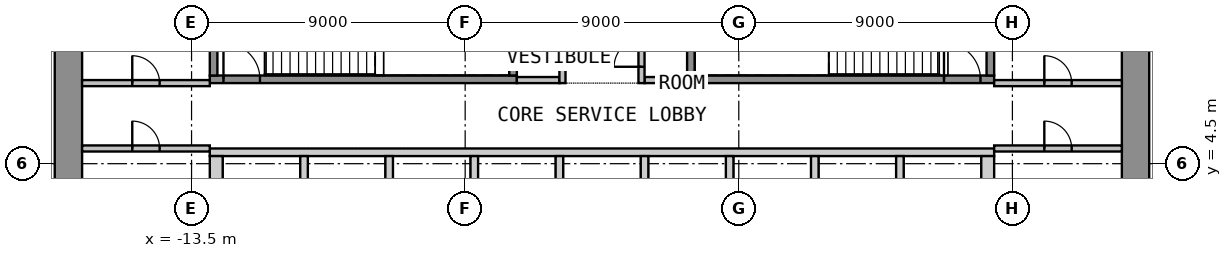
"""IFC4 building model, lengths in metres.
Left out: names, types, materials, properties, quantities, classifications, styles, units other than length and angle.
Written with IfcOpenShell. Run it as: python <this file> out.ifc"""

import sys

from ifc_helpers import new_model, si_unit, direction, frame, frame_2d, origin, place, context, subcontext, project, spatial, polyline, rectangle, outline, extrude, element, fill, save


model = new_model("IFC4")
c1 = context("Model", 3, precision=1e-05, world=origin(), true_north=direction((0.0, 1.0)))
c2 = subcontext(c1, "Body", "Model", "MODEL_VIEW")
j1 = project(units=[si_unit("LENGTHUNIT", "METRE"), si_unit("PLANEANGLEUNIT", "RADIAN")], contexts=[c1])
p1 = place(None, origin())
s1 = spatial("IfcSite", under=j1, at=p1, CompositionType="ELEMENT")
p2 = place(p1, origin())
s2 = spatial("IfcBuilding", under=s1, at=p2, CompositionType="ELEMENT")
p3 = place(p2, frame((0.0, 0.0, 10.8)))
s3 = spatial("IfcBuildingStorey", under=s2, at=p3, CompositionType="ELEMENT", Elevation=10.8)
p4 = place(p3, frame((-17.55, -12.6, 0.0), z_axis=(0.0, 0.0, 1.0), x_axis=(0.0, 1.0, 0.0)))
e1 = element("IfcWall", 1, at=p4, inside=s3, PredefinedType="SHEAR", context=c2, shape_type="SweptSolid", body=[
    extrude(rectangle(XDim=25.2, YDim=0.9, at=frame_2d((12.6, 0.0))), origin(), (0.0, 0.0, 1.0), 4.4),
])
p5 = place(p4, frame((11.4, 0.0, 0.0)))
e2 = element("IfcOpeningElement", 2, at=p5, cuts=e1, PredefinedType="OPENING", context=c2, shape_type="SweptSolid", body=[
    extrude(rectangle(XDim=2.4, YDim=2.1, at=frame_2d((1.2, 1.05))), frame((0.0, 0.46, 0.0), z_axis=(0.0, -1.0, 0.0), x_axis=(1.0, 0.0, 0.0)), (0.0, 0.0, 1.0), 0.92),
])
p6 = place(p3, frame((17.55, -12.6, 0.0), z_axis=(0.0, 0.0, 1.0), x_axis=(0.0, 1.0, 0.0)))
e3 = element("IfcWall", 3, at=p6, inside=s3, PredefinedType="SHEAR", context=c2, shape_type="SweptSolid", body=[
    extrude(rectangle(XDim=25.2, YDim=0.9, at=frame_2d((12.6, 0.0))), origin(), (0.0, 0.0, 1.0), 4.4),
])
p7 = place(p6, frame((11.4, 0.0, 0.0)))
e4 = element("IfcOpeningElement", 4, at=p7, cuts=e3, PredefinedType="OPENING", context=c2, shape_type="SweptSolid", body=[
    extrude(rectangle(XDim=2.4, YDim=2.1, at=frame_2d((1.2, 1.05))), frame((0.0, 0.46, 0.0), z_axis=(0.0, -1.0, 0.0), x_axis=(1.0, 0.0, 0.0)), (0.0, 0.0, 1.0), 0.92),
])
p8 = place(p3, origin())
e5 = element("IfcWall", 5, at=p8, inside=s3, PredefinedType="SHEAR", context=c2, shape_type="SweptSolid", body=[
    extrude(outline(polyline([(-12.9, 4.75), (12.9, 4.75), (12.9, 5.0), (-12.9, 5.0), (-12.9, 4.75)])), origin(), (0.0, 0.0, 1.0), 4.4),
])
p9 = place(p3, origin())
e6 = element("IfcWall", 6, at=p9, inside=s3, PredefinedType="SHEAR", context=c2, shape_type="SweptSolid", body=[
    extrude(outline(polyline([(-12.9, 2.05), (-12.475, 2.05), (-12.475, 4.75), (-12.9, 4.75), (-12.9, 2.05)])), origin(), (0.0, 0.0, 1.0), 4.4),
])
p10 = place(p3, origin())
e7 = element("IfcWall", 7, at=p10, inside=s3, PredefinedType="SHEAR", context=c2, shape_type="SweptSolid", body=[
    extrude(outline(polyline([(-9.925, 2.05), (-9.675, 2.05), (-9.675, 4.75), (-9.925, 4.75), (-9.925, 2.05)])), origin(), (0.0, 0.0, 1.0), 4.4),
])
p11 = place(p3, origin())
e8 = element("IfcWall", 8, at=p11, inside=s3, PredefinedType="SHEAR", context=c2, shape_type="SweptSolid", body=[
    extrude(outline(polyline([(-7.125, 2.05), (-6.875, 2.05), (-6.875, 4.75), (-7.125, 4.75), (-7.125, 2.05)])), origin(), (0.0, 0.0, 1.0), 4.4),
])
p12 = place(p3, origin())
e9 = element("IfcWall", 9, at=p12, inside=s3, PredefinedType="SHEAR", context=c2, shape_type="SweptSolid", body=[
    extrude(outline(polyline([(-4.325, 2.05), (-4.075, 2.05), (-4.075, 4.75), (-4.325, 4.75), (-4.325, 2.05)])), origin(), (0.0, 0.0, 1.0), 4.4),
])
p13 = place(p3, origin())
e10 = element("IfcWall", 10, at=p13, inside=s3, PredefinedType="SHEAR", context=c2, shape_type="SweptSolid", body=[
    extrude(outline(polyline([(-1.525, 2.05), (-1.275, 2.05), (-1.275, 4.75), (-1.525, 4.75), (-1.525, 2.05)])), origin(), (0.0, 0.0, 1.0), 4.4),
])
p14 = place(p3, origin())
e11 = element("IfcWall", 11, at=p14, inside=s3, PredefinedType="SHEAR", context=c2, shape_type="SweptSolid", body=[
    extrude(outline(polyline([(1.275, 2.05), (1.525, 2.05), (1.525, 4.75), (1.275, 4.75), (1.275, 2.05)])), origin(), (0.0, 0.0, 1.0), 4.4),
])
p15 = place(p3, origin())
e12 = element("IfcWall", 12, at=p15, inside=s3, PredefinedType="SHEAR", context=c2, shape_type="SweptSolid", body=[
    extrude(outline(polyline([(4.075, 2.05), (4.325, 2.05), (4.325, 4.75), (4.075, 4.75), (4.075, 2.05)])), origin(), (0.0, 0.0, 1.0), 4.4),
])
p16 = place(p3, origin())
e13 = element("IfcWall", 13, at=p16, inside=s3, PredefinedType="SHEAR", context=c2, shape_type="SweptSolid", body=[
    extrude(outline(polyline([(6.875, 2.05), (7.125, 2.05), (7.125, 4.75), (6.875, 4.75), (6.875, 2.05)])), origin(), (0.0, 0.0, 1.0), 4.4),
])
p17 = place(p3, origin())
e14 = element("IfcWall", 14, at=p17, inside=s3, PredefinedType="SHEAR", context=c2, shape_type="SweptSolid", body=[
    extrude(outline(polyline([(9.675, 2.05), (9.925, 2.05), (9.925, 4.75), (9.675, 4.75), (9.675, 2.05)])), origin(), (0.0, 0.0, 1.0), 4.4),
])
p18 = place(p3, origin())
e15 = element("IfcWall", 15, at=p18, inside=s3, PredefinedType="SHEAR", context=c2, shape_type="SweptSolid", body=[
    extrude(outline(polyline([(12.475, 2.05), (12.9, 2.05), (12.9, 4.75), (12.475, 4.75), (12.475, 2.05)])), origin(), (0.0, 0.0, 1.0), 4.4),
])
p19 = place(p3, frame((-12.9, 7.275, 0.0), z_axis=(0.0, 0.0, 1.0), x_axis=(1.0, 0.0, 0.0)))
e16 = element("IfcWall", 16, at=p19, inside=s3, PredefinedType="SHEAR", context=c2, shape_type="SweptSolid", body=[
    extrude(rectangle(XDim=10.1, YDim=0.25, at=frame_2d((5.05, 0.0))), origin(), (0.0, 0.0, 1.0), 4.4),
])
p20 = place(p19, frame((0.45, 0.0, 0.0)))
e17 = element("IfcOpeningElement", 17, at=p20, cuts=e16, PredefinedType="OPENING", context=c2, shape_type="SweptSolid", body=[
    extrude(rectangle(XDim=1.2, YDim=2.1, at=frame_2d((0.6, 1.05))), frame((0.0, 0.135, 0.0), z_axis=(0.0, -1.0, 0.0), x_axis=(1.0, 0.0, 0.0)), (0.0, 0.0, 1.0), 0.27),
])
for number, where, z_axis, x_axis in (
    (18, (-12.775, 7.4, 0.0), (0.0, 0.0, 1.0), (0.0, 1.0, 0.0)),
    (19, (-2.925, 7.4, 0.0), (0.0, 0.0, 1.0), (0.0, 1.0, 0.0)),
):
    element("IfcWall", number, at=place(p3, frame(where, z_axis=z_axis, x_axis=x_axis)), inside=s3, PredefinedType="SHEAR", context=c2, shape_type="SweptSolid", body=[
        extrude(rectangle(XDim=3.25, YDim=0.25, at=frame_2d((1.625, 0.0))), origin(), (0.0, 0.0, 1.0), 4.4),
    ])
p21 = place(p3, frame((2.8, 7.275, 0.0), z_axis=(0.0, 0.0, 1.0), x_axis=(1.0, 0.0, 0.0)))
e20 = element("IfcWall", 20, at=p21, inside=s3, PredefinedType="SHEAR", context=c2, shape_type="SweptSolid", body=[
    extrude(rectangle(XDim=10.1, YDim=0.25, at=frame_2d((5.05, 0.0))), origin(), (0.0, 0.0, 1.0), 4.4),
])
p22 = place(p21, frame((8.45, 0.0, 0.0)))
e21 = element("IfcOpeningElement", 21, at=p22, cuts=e20, PredefinedType="OPENING", context=c2, shape_type="SweptSolid", body=[
    extrude(rectangle(XDim=1.2, YDim=2.1, at=frame_2d((0.6, 1.05))), frame((0.0, 0.135, 0.0), z_axis=(0.0, -1.0, 0.0), x_axis=(1.0, 0.0, 0.0)), (0.0, 0.0, 1.0), 0.27),
])
for number, where, z_axis, x_axis in (
    (22, (2.925, 7.4, 0.0), (0.0, 0.0, 1.0), (0.0, 1.0, 0.0)),
    (23, (12.775, 7.4, 0.0), (0.0, 0.0, 1.0), (0.0, 1.0, 0.0)),
):
    element("IfcWall", number, at=place(p3, frame(where, z_axis=z_axis, x_axis=x_axis)), inside=s3, PredefinedType="SHEAR", context=c2, shape_type="SweptSolid", body=[
        extrude(rectangle(XDim=3.25, YDim=0.25, at=frame_2d((1.625, 0.0))), origin(), (0.0, 0.0, 1.0), 4.4),
    ])
for number, where, z_axis, x_axis in (
    (24, (-2.8, 7.25, 0.0), (0.0, 0.0, 1.0), (1.0, 0.0, 0.0)),
    (25, (1.4, 7.25, 0.0), (0.0, 0.0, 1.0), (1.0, 0.0, 0.0)),
):
    element("IfcWall", number, at=place(p3, frame(where, z_axis=z_axis, x_axis=x_axis)), inside=s3, PredefinedType="PARTITIONING", context=c2, shape_type="SweptSolid", body=[
        extrude(rectangle(XDim=1.4, YDim=0.2, at=frame_2d((0.7, 0.0))), origin(), (0.0, 0.0, 1.0), 4.4),
    ])
p23 = place(p3, frame((-1.3, 7.15, 0.0), z_axis=(0.0, 0.0, 1.0), x_axis=(0.0, 1.0, 0.0)))
e26 = element("IfcWall", 26, at=p23, inside=s3, PredefinedType="PARTITIONING", context=c2, shape_type="SweptSolid", body=[
    extrude(rectangle(XDim=5.45, YDim=0.2, at=frame_2d((2.725, 0.0))), origin(), (0.0, 0.0, 1.0), 4.4),
])
p24 = place(p23, frame((1.587, 0.0, 0.0)))
e27 = element("IfcOpeningElement", 27, at=p24, cuts=e26, PredefinedType="OPENING", context=c2, shape_type="SweptSolid", body=[
    extrude(rectangle(XDim=0.9, YDim=2.1, at=frame_2d((0.45, 1.05))), frame((0.0, 0.11, 0.0), z_axis=(0.0, -1.0, 0.0), x_axis=(1.0, 0.0, 0.0)), (0.0, 0.0, 1.0), 0.22),
])
p25 = place(p23, frame((4.212, 0.0, 0.0)))
e28 = element("IfcOpeningElement", 28, at=p25, cuts=e26, PredefinedType="OPENING", context=c2, shape_type="SweptSolid", body=[
    extrude(rectangle(XDim=0.9, YDim=2.1, at=frame_2d((0.45, 1.05))), frame((0.0, 0.11, 0.0), z_axis=(0.0, -1.0, 0.0), x_axis=(1.0, 0.0, 0.0)), (0.0, 0.0, 1.0), 0.22),
])
p26 = place(p3, frame((1.3, 7.15, 0.0), z_axis=(0.0, 0.0, 1.0), x_axis=(0.0, 1.0, 0.0)))
e29 = element("IfcWall", 29, at=p26, inside=s3, PredefinedType="PARTITIONING", context=c2, shape_type="SweptSolid", body=[
    extrude(rectangle(XDim=5.45, YDim=0.2, at=frame_2d((2.725, 0.0))), origin(), (0.0, 0.0, 1.0), 4.4),
])
p27 = place(p26, frame((0.538, 0.0, 0.0)))
e30 = element("IfcOpeningElement", 30, at=p27, cuts=e29, PredefinedType="OPENING", context=c2, shape_type="SweptSolid", body=[
    extrude(rectangle(XDim=0.9, YDim=2.1, at=frame_2d((0.45, 1.05))), frame((0.0, 0.11, 0.0), z_axis=(0.0, -1.0, 0.0), x_axis=(1.0, 0.0, 0.0)), (0.0, 0.0, 1.0), 0.22),
])
p28 = place(p26, frame((3.163, 0.0, 0.0)))
e31 = element("IfcOpeningElement", 31, at=p28, cuts=e29, PredefinedType="OPENING", context=c2, shape_type="SweptSolid", body=[
    extrude(rectangle(XDim=0.9, YDim=2.1, at=frame_2d((0.45, 1.05))), frame((0.0, 0.11, 0.0), z_axis=(0.0, -1.0, 0.0), x_axis=(1.0, 0.0, 0.0)), (0.0, 0.0, 1.0), 0.22),
])
p29 = place(p3, frame((-17.1, 7.15, 0.0), z_axis=(0.0, 0.0, 1.0), x_axis=(1.0, 0.0, 0.0)))
e32 = element("IfcWall", 32, at=p29, inside=s3, PredefinedType="PARTITIONING", context=c2, shape_type="SweptSolid", body=[
    extrude(rectangle(XDim=4.2, YDim=0.2, at=frame_2d((2.1, 0.0))), origin(), (0.0, 0.0, 1.0), 4.4),
])
p30 = place(p29, frame((1.65, 0.0, 0.0)))
e33 = element("IfcOpeningElement", 33, at=p30, cuts=e32, PredefinedType="OPENING", context=c2, shape_type="SweptSolid", body=[
    extrude(rectangle(XDim=0.9, YDim=2.1, at=frame_2d((0.45, 1.05))), frame((0.0, 0.11, 0.0), z_axis=(0.0, -1.0, 0.0), x_axis=(1.0, 0.0, 0.0)), (0.0, 0.0, 1.0), 0.22),
])
p31 = place(p3, frame((-17.1, 5.0, 0.0), z_axis=(0.0, 0.0, 1.0), x_axis=(1.0, 0.0, 0.0)))
e34 = element("IfcWall", 34, at=p31, inside=s3, PredefinedType="PARTITIONING", context=c2, shape_type="SweptSolid", body=[
    extrude(rectangle(XDim=4.2, YDim=0.2, at=frame_2d((2.1, 0.0))), origin(), (0.0, 0.0, 1.0), 4.4),
])
p32 = place(p31, frame((1.65, 0.0, 0.0)))
e35 = element("IfcOpeningElement", 35, at=p32, cuts=e34, PredefinedType="OPENING", context=c2, shape_type="SweptSolid", body=[
    extrude(rectangle(XDim=0.9, YDim=2.1, at=frame_2d((0.45, 1.05))), frame((0.0, 0.11, 0.0), z_axis=(0.0, -1.0, 0.0), x_axis=(1.0, 0.0, 0.0)), (0.0, 0.0, 1.0), 0.22),
])
p33 = place(p3, frame((12.9, 7.15, 0.0), z_axis=(0.0, 0.0, 1.0), x_axis=(1.0, 0.0, 0.0)))
e36 = element("IfcWall", 36, at=p33, inside=s3, PredefinedType="PARTITIONING", context=c2, shape_type="SweptSolid", body=[
    extrude(rectangle(XDim=4.2, YDim=0.2, at=frame_2d((2.1, 0.0))), origin(), (0.0, 0.0, 1.0), 4.4),
])
p34 = place(p33, frame((1.65, 0.0, 0.0)))
e37 = element("IfcOpeningElement", 37, at=p34, cuts=e36, PredefinedType="OPENING", context=c2, shape_type="SweptSolid", body=[
    extrude(rectangle(XDim=0.9, YDim=2.1, at=frame_2d((0.45, 1.05))), frame((0.0, 0.11, 0.0), z_axis=(0.0, -1.0, 0.0), x_axis=(1.0, 0.0, 0.0)), (0.0, 0.0, 1.0), 0.22),
])
p35 = place(p3, frame((12.9, 5.0, 0.0), z_axis=(0.0, 0.0, 1.0), x_axis=(1.0, 0.0, 0.0)))
e38 = element("IfcWall", 38, at=p35, inside=s3, PredefinedType="PARTITIONING", context=c2, shape_type="SweptSolid", body=[
    extrude(rectangle(XDim=4.2, YDim=0.2, at=frame_2d((2.1, 0.0))), origin(), (0.0, 0.0, 1.0), 4.4),
])
p36 = place(p35, frame((1.65, 0.0, 0.0)))
e39 = element("IfcOpeningElement", 39, at=p36, cuts=e38, PredefinedType="OPENING", context=c2, shape_type="SweptSolid", body=[
    extrude(rectangle(XDim=0.9, YDim=2.1, at=frame_2d((0.45, 1.05))), frame((0.0, 0.11, 0.0), z_axis=(0.0, -1.0, 0.0), x_axis=(1.0, 0.0, 0.0)), (0.0, 0.0, 1.0), 0.22),
])
p37 = place(p20, origin())
e40 = element("IfcDoor", 40, at=p37, inside=s3, OperationType="SINGLE_SWING_LEFT", PredefinedType="DOOR", context=c2, shape_type="SweptSolid", body=[
    extrude(rectangle(XDim=1.2, YDim=2.1, at=frame_2d((0.6, 1.05))), frame((0.0, 0.025, 0.0), z_axis=(0.0, -1.0, 0.0), x_axis=(1.0, 0.0, 0.0)), (0.0, 0.0, 1.0), 0.05),
])
fill(e17, e40)
p38 = place(p22, origin())
e41 = element("IfcDoor", 41, at=p38, inside=s3, OperationType="SINGLE_SWING_LEFT", PredefinedType="DOOR", context=c2, shape_type="SweptSolid", body=[
    extrude(rectangle(XDim=1.2, YDim=2.1, at=frame_2d((0.6, 1.05))), frame((0.0, 0.025, 0.0), z_axis=(0.0, -1.0, 0.0), x_axis=(1.0, 0.0, 0.0)), (0.0, 0.0, 1.0), 0.05),
])
fill(e21, e41)
p39 = place(p27, origin())
e42 = element("IfcDoor", 42, at=p39, inside=s3, OperationType="SINGLE_SWING_LEFT", PredefinedType="DOOR", context=c2, shape_type="SweptSolid", body=[
    extrude(rectangle(XDim=0.9, YDim=2.1, at=frame_2d((0.45, 1.05))), frame((0.0, 0.025, 0.0), z_axis=(0.0, -1.0, 0.0), x_axis=(1.0, 0.0, 0.0)), (0.0, 0.0, 1.0), 0.05),
])
fill(e30, e42)
p40 = place(p30, origin())
e43 = element("IfcDoor", 43, at=p40, inside=s3, OperationType="SINGLE_SWING_LEFT", PredefinedType="DOOR", context=c2, shape_type="SweptSolid", body=[
    extrude(rectangle(XDim=0.9, YDim=2.1, at=frame_2d((0.45, 1.05))), frame((0.0, 0.025, 0.0), z_axis=(0.0, -1.0, 0.0), x_axis=(1.0, 0.0, 0.0)), (0.0, 0.0, 1.0), 0.05),
])
fill(e33, e43)
p41 = place(p32, origin())
e44 = element("IfcDoor", 44, at=p41, inside=s3, OperationType="SINGLE_SWING_LEFT", PredefinedType="DOOR", context=c2, shape_type="SweptSolid", body=[
    extrude(rectangle(XDim=0.9, YDim=2.1, at=frame_2d((0.45, 1.05))), frame((0.0, 0.025, 0.0), z_axis=(0.0, -1.0, 0.0), x_axis=(1.0, 0.0, 0.0)), (0.0, 0.0, 1.0), 0.05),
])
fill(e35, e44)
p42 = place(p34, origin())
e45 = element("IfcDoor", 45, at=p42, inside=s3, OperationType="SINGLE_SWING_LEFT", PredefinedType="DOOR", context=c2, shape_type="SweptSolid", body=[
    extrude(rectangle(XDim=0.9, YDim=2.1, at=frame_2d((0.45, 1.05))), frame((0.0, 0.025, 0.0), z_axis=(0.0, -1.0, 0.0), x_axis=(1.0, 0.0, 0.0)), (0.0, 0.0, 1.0), 0.05),
])
fill(e37, e45)
p43 = place(p36, origin())
e46 = element("IfcDoor", 46, at=p43, inside=s3, OperationType="SINGLE_SWING_LEFT", PredefinedType="DOOR", context=c2, shape_type="SweptSolid", body=[
    extrude(rectangle(XDim=0.9, YDim=2.1, at=frame_2d((0.45, 1.05))), frame((0.0, 0.025, 0.0), z_axis=(0.0, -1.0, 0.0), x_axis=(1.0, 0.0, 0.0)), (0.0, 0.0, 1.0), 0.05),
])
fill(e39, e46)
save(model, sys.argv[1])
